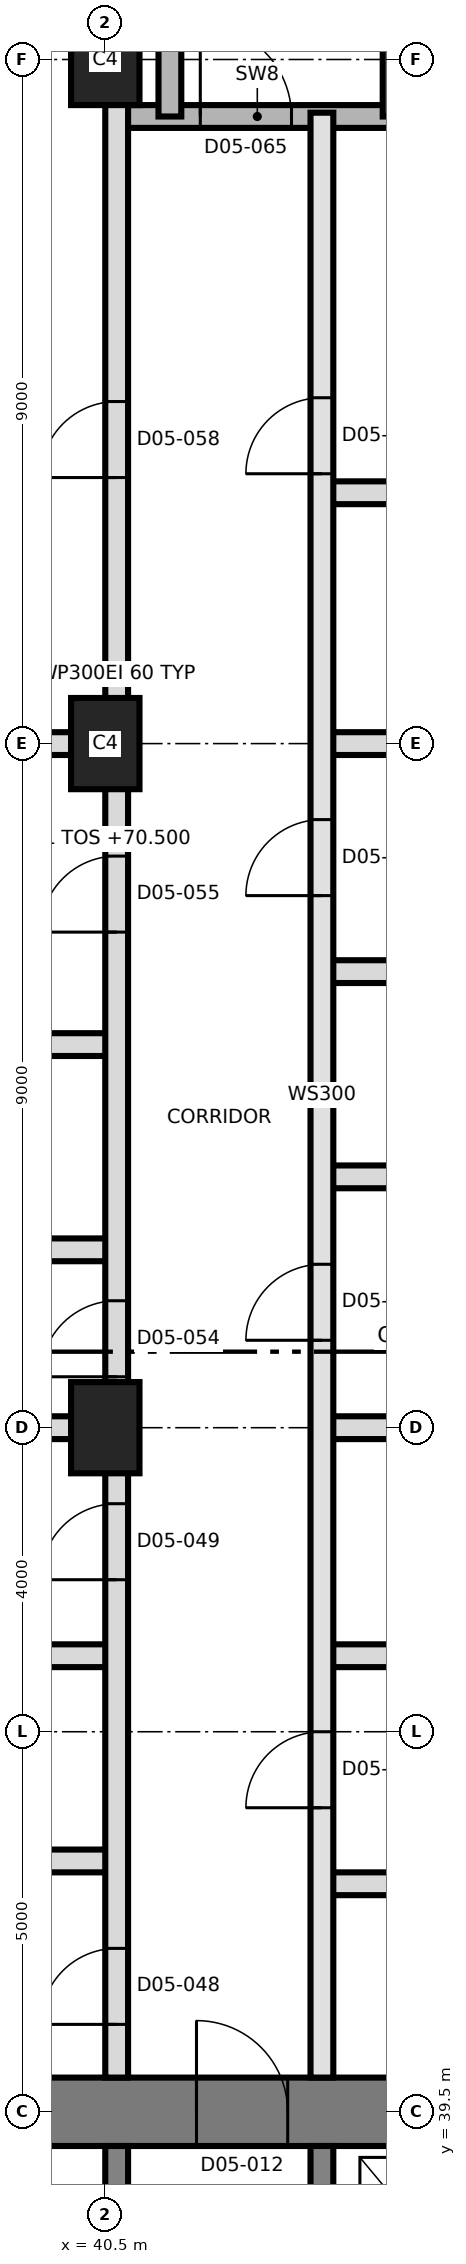
"""IFC4 building model, lengths in metres.
Left out: names, types, materials, properties, quantities, classifications, styles, units other than length and angle.
Written with IfcOpenShell. Run it as: python <this file> out.ifc"""

import sys

from ifc_helpers import new_model, si_unit, direction, frame, frame_2d, origin, origin_2d, place, context, subcontext, project, spatial, rectangle, extrude, element, fill, save


model = new_model("IFC4")
c1 = context("Model", 3, precision=1e-05, world=origin(), true_north=direction((0.0, 1.0)))
c2 = subcontext(c1, "Body", "Model", "MODEL_VIEW")
j1 = project(units=[si_unit("LENGTHUNIT", "METRE"), si_unit("PLANEANGLEUNIT", "RADIAN")], contexts=[c1])
p1 = place(None, origin())
s1 = spatial("IfcSite", under=j1, at=p1, CompositionType="ELEMENT")
p2 = place(p1, origin())
s2 = spatial("IfcBuilding", under=s1, at=p2, CompositionType="ELEMENT")
p3 = place(p2, frame((0.0, 0.0, 70.5)))
s3 = spatial("IfcBuildingStorey", under=s2, at=p3, CompositionType="ELEMENT", Elevation=70.5)
p4 = place(p3, frame((31.05, 39.5, 0.0), z_axis=(0.0, 0.0, 1.0), x_axis=(1.0, 0.0, 0.0)))
e1 = element("IfcWall", 1, at=p4, inside=s3, PredefinedType="SHEAR", context=c2, shape_type="SweptSolid", body=[
    extrude(rectangle(XDim=27.0, YDim=0.9, at=frame_2d((13.5, 0.0))), origin(), (0.0, 0.0, 1.0), 3.7),
])
p5 = place(p4, frame((10.65, 0.0, 0.0)))
e2 = element("IfcOpeningElement", 2, at=p5, cuts=e1, PredefinedType="OPENING", context=c2, shape_type="SweptSolid", body=[
    extrude(rectangle(XDim=1.2, YDim=2.1, at=frame_2d((0.6, 1.05))), frame((0.0, 0.46, 0.0), z_axis=(0.0, -1.0, 0.0), x_axis=(1.0, 0.0, 0.0)), (0.0, 0.0, 1.0), 0.92),
])
for number, where, z_axis, x_axis in (
    (3, (40.65, 33.5, 0.0), (0.0, 0.0, 1.0), (0.0, 1.0, 0.0)),
    (4, (43.35, 33.5, 0.0), (0.0, 0.0, 1.0), (0.0, 1.0, 0.0)),
):
    element("IfcWall", number, at=place(p3, frame(where, z_axis=z_axis, x_axis=x_axis)), inside=s3, PredefinedType="SHEAR", context=c2, shape_type="SweptSolid", body=[
        extrude(rectangle(XDim=5.55, YDim=0.3, at=frame_2d((2.775, 0.0))), origin(), (0.0, 0.0, 1.0), 3.7),
    ])
for number, where, z_axis, x_axis in (
    (5, (40.5, 48.5, 0.0), (0.0, 0.0, 1.0), (0.0, 1.0, 0.0)),
    (6, (40.5, 57.5, 0.0), (0.0, 0.0, 1.0), (0.0, 1.0, 0.0)),
    (7, (40.5, 66.5, 0.0), (0.0, 0.0, 1.0), (0.0, 1.0, 0.0)),
):
    element("IfcColumn", number, at=place(p3, frame(where, z_axis=z_axis, x_axis=x_axis)), inside=s3, PredefinedType="COLUMN", context=c2, shape_type="SweptSolid", body=[
        extrude(rectangle(XDim=1.2, YDim=0.9, at=origin_2d()), origin(), (0.0, 0.0, 1.0), 3.7),
    ])
p6 = place(p3, frame((43.35, 42.5, 0.0), z_axis=(0.0, 0.0, 1.0), x_axis=(1.0, 0.0, 0.0)))
e8 = element("IfcWall", 8, at=p6, inside=s3, PredefinedType="PARTITIONING", context=c2, shape_type="SweptSolid", body=[
    extrude(rectangle(XDim=3.3, YDim=0.3, at=frame_2d((1.65, 0.0))), origin(), (0.0, 0.0, 1.0), 3.4),
])
p7 = place(p3, frame((37.45, 42.8, 0.0), z_axis=(0.0, 0.0, 1.0), x_axis=(1.0, 0.0, 0.0)))
e9 = element("IfcWall", 9, at=p7, inside=s3, PredefinedType="PARTITIONING", context=c2, shape_type="SweptSolid", body=[
    extrude(rectangle(XDim=3.2, YDim=0.3, at=frame_2d((1.6, 0.0))), origin(), (0.0, 0.0, 1.0), 3.4),
])
p8 = place(p3, frame((30.35, 45.5, 0.0), z_axis=(0.0, 0.0, 1.0), x_axis=(1.0, 0.0, 0.0)))
e10 = element("IfcWall", 10, at=p8, inside=s3, PredefinedType="PARTITIONING", context=c2, shape_type="SweptSolid", body=[
    extrude(rectangle(XDim=10.3, YDim=0.3, at=frame_2d((5.15, 0.0))), origin(), (0.0, 0.0, 1.0), 3.4),
])
p9 = place(p3, frame((43.35, 45.5, 0.0), z_axis=(0.0, 0.0, 1.0), x_axis=(1.0, 0.0, 0.0)))
e11 = element("IfcWall", 11, at=p9, inside=s3, PredefinedType="PARTITIONING", context=c2, shape_type="SweptSolid", body=[
    extrude(rectangle(XDim=3.3, YDim=0.3, at=frame_2d((1.65, 0.0))), origin(), (0.0, 0.0, 1.0), 3.4),
])
p10 = place(p3, frame((30.35, 48.5, 0.0), z_axis=(0.0, 0.0, 1.0), x_axis=(1.0, 0.0, 0.0)))
e12 = element("IfcWall", 12, at=p10, inside=s3, PredefinedType="PARTITIONING", context=c2, shape_type="SweptSolid", body=[
    extrude(rectangle(XDim=10.3, YDim=0.3, at=frame_2d((5.15, 0.0))), origin(), (0.0, 0.0, 1.0), 3.4),
])
p11 = place(p3, frame((43.35, 48.5, 0.0), z_axis=(0.0, 0.0, 1.0), x_axis=(1.0, 0.0, 0.0)))
e13 = element("IfcWall", 13, at=p11, inside=s3, PredefinedType="PARTITIONING", context=c2, shape_type="SweptSolid", body=[
    extrude(rectangle(XDim=7.48, YDim=0.3, at=frame_2d((3.74, 0.0))), origin(), (0.0, 0.0, 1.0), 3.4),
])
for number, where, z_axis, x_axis in (
    (14, (37.45, 50.84, 0.0), (0.0, 0.0, 1.0), (1.0, 0.0, 0.0)),
    (15, (43.35, 51.8, 0.0), (0.0, 0.0, 1.0), (1.0, 0.0, 0.0)),
):
    element("IfcWall", number, at=place(p3, frame(where, z_axis=z_axis, x_axis=x_axis)), inside=s3, PredefinedType="PARTITIONING", context=c2, shape_type="SweptSolid", body=[
        extrude(rectangle(XDim=3.2, YDim=0.3, at=frame_2d((1.6, 0.0))), origin(), (0.0, 0.0, 1.0), 3.4),
    ])
p12 = place(p3, frame((30.35, 53.54, 0.0), z_axis=(0.0, 0.0, 1.0), x_axis=(1.0, 0.0, 0.0)))
e16 = element("IfcWall", 16, at=p12, inside=s3, PredefinedType="PARTITIONING", context=c2, shape_type="SweptSolid", body=[
    extrude(rectangle(XDim=10.3, YDim=0.3, at=frame_2d((5.15, 0.0))), origin(), (0.0, 0.0, 1.0), 3.4),
])
p13 = place(p3, frame((43.35, 54.5, 0.0), z_axis=(0.0, 0.0, 1.0), x_axis=(1.0, 0.0, 0.0)))
e17 = element("IfcWall", 17, at=p13, inside=s3, PredefinedType="PARTITIONING", context=c2, shape_type="SweptSolid", body=[
    extrude(rectangle(XDim=7.48, YDim=0.3, at=frame_2d((3.74, 0.0))), origin(), (0.0, 0.0, 1.0), 3.4),
])
p14 = place(p3, frame((30.35, 57.5, 0.0), z_axis=(0.0, 0.0, 1.0), x_axis=(1.0, 0.0, 0.0)))
e18 = element("IfcWall", 18, at=p14, inside=s3, PredefinedType="PARTITIONING", context=c2, shape_type="SweptSolid", body=[
    extrude(rectangle(XDim=10.3, YDim=0.3, at=frame_2d((5.15, 0.0))), origin(), (0.0, 0.0, 1.0), 3.4),
])
p15 = place(p3, frame((43.35, 57.5, 0.0), z_axis=(0.0, 0.0, 1.0), x_axis=(1.0, 0.0, 0.0)))
e19 = element("IfcWall", 19, at=p15, inside=s3, PredefinedType="PARTITIONING", context=c2, shape_type="SweptSolid", body=[
    extrude(rectangle(XDim=7.48, YDim=0.3, at=frame_2d((3.74, 0.0))), origin(), (0.0, 0.0, 1.0), 3.4),
])
p16 = place(p3, frame((43.35, 60.8, 0.0), z_axis=(0.0, 0.0, 1.0), x_axis=(1.0, 0.0, 0.0)))
e20 = element("IfcWall", 20, at=p16, inside=s3, PredefinedType="PARTITIONING", context=c2, shape_type="SweptSolid", body=[
    extrude(rectangle(XDim=3.5, YDim=0.3, at=frame_2d((1.75, 0.0))), origin(), (0.0, 0.0, 1.0), 3.4),
])
p17 = place(p3, frame((40.65, 65.75, 0.0), z_axis=(0.0, 0.0, 1.0), x_axis=(1.0, 0.0, 0.0)))
e21 = element("IfcWall", 21, at=p17, inside=s3, PredefinedType="SHEAR", context=c2, shape_type="SweptSolid", body=[
    extrude(rectangle(XDim=3.7, YDim=0.3, at=frame_2d((1.85, 0.0))), origin(), (0.0, 0.0, 1.0), 3.4),
])
p18 = place(p17, frame((1.1, 0.0, 0.0)))
e22 = element("IfcOpeningElement", 22, at=p18, cuts=e21, PredefinedType="OPENING", context=c2, shape_type="SweptSolid", body=[
    extrude(rectangle(XDim=1.2, YDim=2.1, at=frame_2d((0.6, 1.05))), frame((0.0, 0.16, 0.0), z_axis=(0.0, -1.0, 0.0), x_axis=(1.0, 0.0, 0.0)), (0.0, 0.0, 1.0), 0.32),
])
p19 = place(p3, frame((40.65, 39.95, 0.0), z_axis=(0.0, 0.0, 1.0), x_axis=(0.0, 1.0, 0.0)))
e23 = element("IfcWall", 23, at=p19, inside=s3, PredefinedType="PARTITIONING", context=c2, shape_type="SweptSolid", body=[
    extrude(rectangle(XDim=36.94, YDim=0.3, at=frame_2d((18.47, 0.0))), origin(), (0.0, 0.0, 1.0), 3.4),
])
p20 = place(p19, frame((0.7, 0.0, 0.0)))
e24 = element("IfcOpeningElement", 24, at=p20, cuts=e23, PredefinedType="OPENING", context=c2, shape_type="SweptSolid", body=[
    extrude(rectangle(XDim=1.0, YDim=2.1, at=frame_2d((0.5, 1.05))), frame((0.0, 0.16, 0.0), z_axis=(0.0, -1.0, 0.0), x_axis=(1.0, 0.0, 0.0)), (0.0, 0.0, 1.0), 0.32),
])
p21 = place(p19, frame((6.55, 0.0, 0.0)))
e25 = element("IfcOpeningElement", 25, at=p21, cuts=e23, PredefinedType="OPENING", context=c2, shape_type="SweptSolid", body=[
    extrude(rectangle(XDim=1.0, YDim=2.1, at=frame_2d((0.5, 1.05))), frame((0.0, 0.16, 0.0), z_axis=(0.0, -1.0, 0.0), x_axis=(1.0, 0.0, 0.0)), (0.0, 0.0, 1.0), 0.32),
])
p22 = place(p19, frame((9.22, 0.0, 0.0)))
e26 = element("IfcOpeningElement", 26, at=p22, cuts=e23, PredefinedType="OPENING", context=c2, shape_type="SweptSolid", body=[
    extrude(rectangle(XDim=1.0, YDim=2.1, at=frame_2d((0.5, 1.05))), frame((0.0, 0.16, 0.0), z_axis=(0.0, -1.0, 0.0), x_axis=(1.0, 0.0, 0.0)), (0.0, 0.0, 1.0), 0.32),
])
p23 = place(p19, frame((15.07, 0.0, 0.0)))
e27 = element("IfcOpeningElement", 27, at=p23, cuts=e23, PredefinedType="OPENING", context=c2, shape_type="SweptSolid", body=[
    extrude(rectangle(XDim=1.0, YDim=2.1, at=frame_2d((0.5, 1.05))), frame((0.0, 0.16, 0.0), z_axis=(0.0, -1.0, 0.0), x_axis=(1.0, 0.0, 0.0)), (0.0, 0.0, 1.0), 0.32),
])
p24 = place(p19, frame((21.05, 0.0, 0.0)))
e28 = element("IfcOpeningElement", 28, at=p24, cuts=e23, PredefinedType="OPENING", context=c2, shape_type="SweptSolid", body=[
    extrude(rectangle(XDim=1.0, YDim=2.4, at=frame_2d((0.5, 1.2))), frame((0.0, 0.16, 0.0), z_axis=(0.0, -1.0, 0.0), x_axis=(1.0, 0.0, 0.0)), (0.0, 0.0, 1.0), 0.32),
])
p25 = place(p3, frame((41.35, 65.75, 0.0), z_axis=(0.0, 0.0, 1.0), x_axis=(0.0, 1.0, 0.0)))
e29 = element("IfcWall", 29, at=p25, inside=s3, PredefinedType="SHEAR", context=c2, shape_type="SweptSolid", body=[
    extrude(rectangle(XDim=8.85, YDim=0.3, at=frame_2d((4.425, 0.0))), origin(), (0.0, 0.0, 1.0), 3.4),
])
p26 = place(p3, frame((43.35, 39.95, 0.0), z_axis=(0.0, 0.0, 1.0), x_axis=(0.0, 1.0, 0.0)))
e30 = element("IfcWall", 30, at=p26, inside=s3, PredefinedType="SOLIDWALL", context=c2, shape_type="SweptSolid", body=[
    extrude(rectangle(XDim=25.85, YDim=0.3, at=frame_2d((12.925, 0.0))), origin(), (0.0, 0.0, 1.0), 3.4),
])
p27 = place(p26, frame((3.55, 0.0, 0.0)))
e31 = element("IfcOpeningElement", 31, at=p27, cuts=e30, PredefinedType="OPENING", context=c2, shape_type="SweptSolid", body=[
    extrude(rectangle(XDim=1.0, YDim=2.4, at=frame_2d((0.5, 1.2))), frame((0.0, 0.16, 0.0), z_axis=(0.0, -1.0, 0.0), x_axis=(1.0, 0.0, 0.0)), (0.0, 0.0, 1.0), 0.32),
])
p28 = place(p26, frame((9.7, 0.0, 0.0)))
e32 = element("IfcOpeningElement", 32, at=p28, cuts=e30, PredefinedType="OPENING", context=c2, shape_type="SweptSolid", body=[
    extrude(rectangle(XDim=1.0, YDim=2.1, at=frame_2d((0.5, 1.05))), frame((0.0, 0.16, 0.0), z_axis=(0.0, -1.0, 0.0), x_axis=(1.0, 0.0, 0.0)), (0.0, 0.0, 1.0), 0.32),
])
p29 = place(p26, frame((15.55, 0.0, 0.0)))
e33 = element("IfcOpeningElement", 33, at=p29, cuts=e30, PredefinedType="OPENING", context=c2, shape_type="SweptSolid", body=[
    extrude(rectangle(XDim=1.0, YDim=2.1, at=frame_2d((0.5, 1.05))), frame((0.0, 0.16, 0.0), z_axis=(0.0, -1.0, 0.0), x_axis=(1.0, 0.0, 0.0)), (0.0, 0.0, 1.0), 0.32),
])
p30 = place(p26, frame((21.1, 0.0, 0.0)))
e34 = element("IfcOpeningElement", 34, at=p30, cuts=e30, PredefinedType="OPENING", context=c2, shape_type="SweptSolid", body=[
    extrude(rectangle(XDim=1.0, YDim=2.4, at=frame_2d((0.5, 1.2))), frame((0.0, 0.16, 0.0), z_axis=(0.0, -1.0, 0.0), x_axis=(1.0, 0.0, 0.0)), (0.0, 0.0, 1.0), 0.32),
])
p31 = place(p3, frame((44.3, 65.75, 0.0), z_axis=(0.0, 0.0, 1.0), x_axis=(0.0, 1.0, 0.0)))
e35 = element("IfcWall", 35, at=p31, inside=s3, PredefinedType="SHEAR", context=c2, shape_type="SweptSolid", body=[
    extrude(rectangle(XDim=8.85, YDim=0.3, at=frame_2d((4.425, 0.0))), origin(), (0.0, 0.0, 1.0), 3.4),
])
p32 = place(p5, origin())
e36 = element("IfcDoor", 36, at=p32, inside=s3, OperationType="SINGLE_SWING_RIGHT", PredefinedType="DOOR", context=c2, shape_type="SweptSolid", body=[
    extrude(rectangle(XDim=1.2, YDim=2.1, at=frame_2d((0.6, 1.05))), frame((0.0, 0.025, 0.0), z_axis=(0.0, -1.0, 0.0), x_axis=(1.0, 0.0, 0.0)), (0.0, 0.0, 1.0), 0.05),
])
fill(e2, e36)
p33 = place(p27, origin())
e37 = element("IfcDoor", 37, at=p33, inside=s3, OperationType="SINGLE_SWING_LEFT", PredefinedType="DOOR", context=c2, shape_type="SweptSolid", body=[
    extrude(rectangle(XDim=1.0, YDim=2.4, at=frame_2d((0.5, 1.2))), frame((0.0, 0.025, 0.0), z_axis=(0.0, -1.0, 0.0), x_axis=(1.0, 0.0, 0.0)), (0.0, 0.0, 1.0), 0.05),
])
fill(e31, e37)
p34 = place(p20, origin())
e38 = element("IfcDoor", 38, at=p34, inside=s3, OperationType="SINGLE_SWING_LEFT", PredefinedType="DOOR", context=c2, shape_type="SweptSolid", body=[
    extrude(rectangle(XDim=1.0, YDim=2.1, at=frame_2d((0.5, 1.05))), frame((0.0, 0.025, 0.0), z_axis=(0.0, -1.0, 0.0), x_axis=(1.0, 0.0, 0.0)), (0.0, 0.0, 1.0), 0.05),
])
fill(e24, e38)
p35 = place(p21, origin())
e39 = element("IfcDoor", 39, at=p35, inside=s3, OperationType="SINGLE_SWING_RIGHT", PredefinedType="DOOR", context=c2, shape_type="SweptSolid", body=[
    extrude(rectangle(XDim=1.0, YDim=2.1, at=frame_2d((0.5, 1.05))), frame((0.0, 0.025, 0.0), z_axis=(0.0, -1.0, 0.0), x_axis=(1.0, 0.0, 0.0)), (0.0, 0.0, 1.0), 0.05),
])
fill(e25, e39)
p36 = place(p28, origin())
e40 = element("IfcDoor", 40, at=p36, inside=s3, OperationType="SINGLE_SWING_LEFT", PredefinedType="DOOR", context=c2, shape_type="SweptSolid", body=[
    extrude(rectangle(XDim=1.0, YDim=2.1, at=frame_2d((0.5, 1.05))), frame((0.0, 0.025, 0.0), z_axis=(0.0, -1.0, 0.0), x_axis=(1.0, 0.0, 0.0)), (0.0, 0.0, 1.0), 0.05),
])
fill(e32, e40)
p37 = place(p29, origin())
e41 = element("IfcDoor", 41, at=p37, inside=s3, OperationType="SINGLE_SWING_RIGHT", PredefinedType="DOOR", context=c2, shape_type="SweptSolid", body=[
    extrude(rectangle(XDim=1.0, YDim=2.1, at=frame_2d((0.5, 1.05))), frame((0.0, 0.025, 0.0), z_axis=(0.0, -1.0, 0.0), x_axis=(1.0, 0.0, 0.0)), (0.0, 0.0, 1.0), 0.05),
])
fill(e33, e41)
p38 = place(p22, origin())
e42 = element("IfcDoor", 42, at=p38, inside=s3, OperationType="SINGLE_SWING_LEFT", PredefinedType="DOOR", context=c2, shape_type="SweptSolid", body=[
    extrude(rectangle(XDim=1.0, YDim=2.1, at=frame_2d((0.5, 1.05))), frame((0.0, 0.025, 0.0), z_axis=(0.0, -1.0, 0.0), x_axis=(1.0, 0.0, 0.0)), (0.0, 0.0, 1.0), 0.05),
])
fill(e26, e42)
p39 = place(p23, origin())
e43 = element("IfcDoor", 43, at=p39, inside=s3, OperationType="SINGLE_SWING_RIGHT", PredefinedType="DOOR", context=c2, shape_type="SweptSolid", body=[
    extrude(rectangle(XDim=1.0, YDim=2.1, at=frame_2d((0.5, 1.05))), frame((0.0, 0.025, 0.0), z_axis=(0.0, -1.0, 0.0), x_axis=(1.0, 0.0, 0.0)), (0.0, 0.0, 1.0), 0.05),
])
fill(e27, e43)
p40 = place(p30, origin())
e44 = element("IfcDoor", 44, at=p40, inside=s3, OperationType="SINGLE_SWING_LEFT", PredefinedType="DOOR", context=c2, shape_type="SweptSolid", body=[
    extrude(rectangle(XDim=1.0, YDim=2.4, at=frame_2d((0.5, 1.2))), frame((0.0, 0.025, 0.0), z_axis=(0.0, -1.0, 0.0), x_axis=(1.0, 0.0, 0.0)), (0.0, 0.0, 1.0), 0.05),
])
fill(e34, e44)
p41 = place(p24, origin())
e45 = element("IfcDoor", 45, at=p41, inside=s3, OperationType="SINGLE_SWING_RIGHT", PredefinedType="DOOR", context=c2, shape_type="SweptSolid", body=[
    extrude(rectangle(XDim=1.0, YDim=2.4, at=frame_2d((0.5, 1.2))), frame((0.0, 0.025, 0.0), z_axis=(0.0, -1.0, 0.0), x_axis=(1.0, 0.0, 0.0)), (0.0, 0.0, 1.0), 0.05),
])
fill(e28, e45)
p42 = place(p18, origin())
e46 = element("IfcDoor", 46, at=p42, inside=s3, OperationType="SINGLE_SWING_RIGHT", PredefinedType="DOOR", context=c2, shape_type="SweptSolid", body=[
    extrude(rectangle(XDim=1.2, YDim=2.1, at=frame_2d((0.6, 1.05))), frame((0.0, 0.025, 0.0), z_axis=(0.0, -1.0, 0.0), x_axis=(1.0, 0.0, 0.0)), (0.0, 0.0, 1.0), 0.05),
])
fill(e22, e46)
save(model, sys.argv[1])
